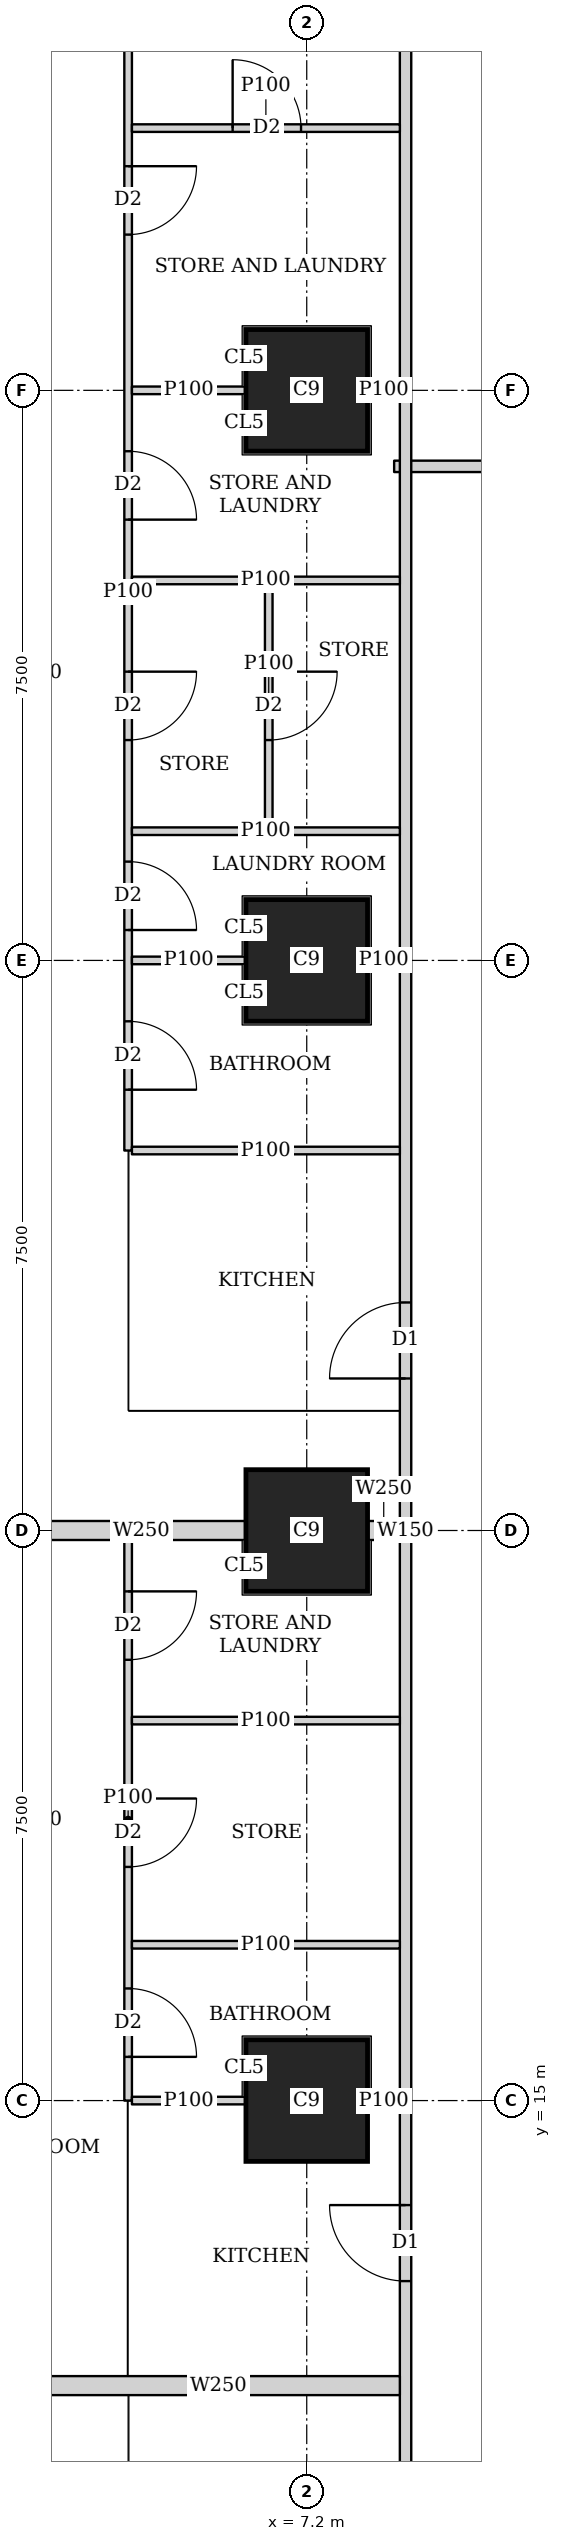
"""IFC4 building model, lengths in metres.
Left out: names, types, materials, properties, quantities, classifications, styles, units other than length and angle.
Written with IfcOpenShell. Run it as: python <this file> out.ifc"""

import sys

from ifc_helpers import new_model, si_unit, direction, frame, frame_2d, origin, origin_2d, place, context, subcontext, project, spatial, rectangle, extrude, element, fill, save


model = new_model("IFC4")
c1 = context("Model", 3, precision=1e-05, world=origin(), true_north=direction((0.0, 1.0)))
c2 = subcontext(c1, "Body", "Model", "MODEL_VIEW")
j1 = project(units=[si_unit("LENGTHUNIT", "METRE"), si_unit("PLANEANGLEUNIT", "RADIAN")], contexts=[c1])
p1 = place(None, origin())
s1 = spatial("IfcSite", under=j1, at=p1, CompositionType="ELEMENT")
p2 = place(p1, origin())
s2 = spatial("IfcBuilding", under=s1, at=p2, CompositionType="ELEMENT")
p3 = place(p2, frame((0.0, 0.0, 111.65)))
s3 = spatial("IfcBuildingStorey", under=s2, at=p3, CompositionType="ELEMENT", Elevation=111.65)
for number, where, z_axis, x_axis in (
    (1, (7.2, 15.0, 0.0), (0.0, 0.0, 1.0), (1.0, 0.0, 0.0)),
    (2, (7.2, 22.5, 0.0), (0.0, 0.0, 1.0), (1.0, 0.0, 0.0)),
    (3, (7.2, 30.0, 0.0), (0.0, 0.0, 1.0), (1.0, 0.0, 0.0)),
    (4, (7.2, 37.5, 0.0), (0.0, 0.0, 1.0), (1.0, 0.0, 0.0)),
):
    element("IfcColumn", number, at=place(p3, frame(where, z_axis=z_axis, x_axis=x_axis)), inside=s3, PredefinedType="COLUMN", context=c2, shape_type="SweptSolid", body=[
        extrude(rectangle(XDim=1.6, YDim=1.6, at=origin_2d()), origin(), (0.0, 0.0, 1.0), 3.75),
    ])
p4 = place(p3, frame((8.5, -0.65, 0.0), z_axis=(0.0, 0.0, 1.0), x_axis=(0.0, 1.0, 0.0)))
e5 = element("IfcWall", 5, at=p4, inside=s3, PredefinedType="SOLIDWALL", context=c2, shape_type="SweptSolid", body=[
    extrude(rectangle(XDim=46.3, YDim=0.15, at=frame_2d((23.15, 0.0))), origin(), (0.0, 0.0, 1.0), 2.2),
])
p5 = place(p4, frame((9.525, 0.0, 0.0)))
e6 = element("IfcOpeningElement", 6, at=p5, cuts=e5, PredefinedType="OPENING", context=c2, shape_type="SweptSolid", body=[
    extrude(rectangle(XDim=1.0, YDim=2.1, at=frame_2d((0.5, 1.05))), frame((0.0, 0.085, 0.0), z_axis=(0.0, -1.0, 0.0), x_axis=(1.0, 0.0, 0.0)), (0.0, 0.0, 1.0), 0.17),
])
p6 = place(p4, frame((13.275, 0.0, 0.0)))
e7 = element("IfcOpeningElement", 7, at=p6, cuts=e5, PredefinedType="OPENING", context=c2, shape_type="SweptSolid", body=[
    extrude(rectangle(XDim=1.0, YDim=2.1, at=frame_2d((0.5, 1.05))), frame((0.0, 0.085, 0.0), z_axis=(0.0, -1.0, 0.0), x_axis=(1.0, 0.0, 0.0)), (0.0, 0.0, 1.0), 0.17),
])
p7 = place(p4, frame((25.15, 0.0, 0.0)))
e8 = element("IfcOpeningElement", 8, at=p7, cuts=e5, PredefinedType="OPENING", context=c2, shape_type="SweptSolid", body=[
    extrude(rectangle(XDim=1.0, YDim=2.1, at=frame_2d((0.5, 1.05))), frame((0.0, 0.085, 0.0), z_axis=(0.0, -1.0, 0.0), x_axis=(1.0, 0.0, 0.0)), (0.0, 0.0, 1.0), 0.17),
])
p8 = place(p3, frame((8.35, 36.5, 0.0), z_axis=(0.0, 0.0, 1.0), x_axis=(1.0, 0.0, 0.0)))
e9 = element("IfcWall", 9, at=p8, inside=s3, PredefinedType="SOLIDWALL", context=c2, shape_type="SweptSolid", body=[
    extrude(rectangle(XDim=26.415, YDim=0.15, at=frame_2d((13.208, 0.0))), origin(), (0.0, 0.0, 1.0), 3.5),
])
p9 = place(p8, frame((2.6, 0.0, 0.0)))
e10 = element("IfcOpeningElement", 10, at=p9, cuts=e9, PredefinedType="OPENING", context=c2, shape_type="SweptSolid", body=[
    extrude(rectangle(XDim=1.0, YDim=2.1, at=frame_2d((0.5, 1.05))), frame((0.0, 0.085, 0.0), z_axis=(0.0, -1.0, 0.0), x_axis=(1.0, 0.0, 0.0)), (0.0, 0.0, 1.0), 0.17),
])
p10 = place(p8, frame((10.949, 0.0, 0.0)))
e11 = element("IfcOpeningElement", 11, at=p10, cuts=e9, PredefinedType="OPENING", context=c2, shape_type="SweptSolid", body=[
    extrude(rectangle(XDim=1.0, YDim=2.1, at=frame_2d((0.5, 1.05))), frame((0.0, 0.085, 0.0), z_axis=(0.0, -1.0, 0.0), x_axis=(1.0, 0.0, 0.0)), (0.0, 0.0, 1.0), 0.17),
])
p11 = place(p8, frame((23.923, 0.0, 0.0)))
e12 = element("IfcOpeningElement", 12, at=p11, cuts=e9, PredefinedType="OPENING", context=c2, shape_type="SweptSolid", body=[
    extrude(rectangle(XDim=1.0, YDim=2.1, at=frame_2d((0.5, 1.05))), frame((0.0, 0.085, 0.0), z_axis=(0.0, -1.0, 0.0), x_axis=(1.0, 0.0, 0.0)), (0.0, 0.0, 1.0), 0.17),
])
p12 = place(p3, frame((4.85, 15.0, 0.0), z_axis=(0.0, 0.0, 1.0), x_axis=(0.0, 1.0, 0.0)))
e13 = element("IfcWall", 13, at=p12, inside=s3, PredefinedType="PARTITIONING", context=c2, shape_type="SweptSolid", body=[
    extrude(rectangle(XDim=7.375, YDim=0.1, at=frame_2d((3.688, 0.0))), origin(), (0.0, 0.0, 1.0), 3.5),
])
p13 = place(p12, frame((0.575, 0.0, 0.0)))
e14 = element("IfcOpeningElement", 14, at=p13, cuts=e13, PredefinedType="OPENING", context=c2, shape_type="SweptSolid", body=[
    extrude(rectangle(XDim=0.9, YDim=2.1, at=frame_2d((0.45, 1.05))), frame((0.0, 0.06, 0.0), z_axis=(0.0, -1.0, 0.0), x_axis=(1.0, 0.0, 0.0)), (0.0, 0.0, 1.0), 0.12),
])
p14 = place(p12, frame((5.799, 0.0, 0.0)))
e15 = element("IfcOpeningElement", 15, at=p14, cuts=e13, PredefinedType="OPENING", context=c2, shape_type="SweptSolid", body=[
    extrude(rectangle(XDim=0.9, YDim=2.1, at=frame_2d((0.45, 1.05))), frame((0.0, 0.06, 0.0), z_axis=(0.0, -1.0, 0.0), x_axis=(1.0, 0.0, 0.0)), (0.0, 0.0, 1.0), 0.12),
])
p15 = place(p12, frame((3.074, 0.0, 0.0)))
e16 = element("IfcOpeningElement", 16, at=p15, cuts=e13, PredefinedType="OPENING", context=c2, shape_type="SweptSolid", body=[
    extrude(rectangle(XDim=0.9, YDim=2.1, at=frame_2d((0.45, 1.05))), frame((0.0, 0.06, 0.0), z_axis=(0.0, -1.0, 0.0), x_axis=(1.0, 0.0, 0.0)), (0.0, 0.0, 1.0), 0.12),
])
p16 = place(p3, frame((4.9, 15.0, 0.0), z_axis=(0.0, 0.0, 1.0), x_axis=(1.0, 0.0, 0.0)))
e17 = element("IfcWall", 17, at=p16, inside=s3, PredefinedType="PARTITIONING", context=c2, shape_type="SweptSolid", body=[
    extrude(rectangle(XDim=1.499, YDim=0.1, at=frame_2d((0.75, 0.0))), origin(), (0.0, 0.0, 1.0), 3.5),
])
p17 = place(p3, frame((8.001, 15.0, 0.0), z_axis=(0.0, 0.0, 1.0), x_axis=(1.0, 0.0, 0.0)))
e18 = element("IfcWall", 18, at=p17, inside=s3, PredefinedType="PARTITIONING", context=c2, shape_type="SweptSolid", body=[
    extrude(rectangle(XDim=0.424, YDim=0.1, at=frame_2d((0.212, 0.0))), origin(), (0.0, 0.0, 1.0), 3.5),
])
for number, where, z_axis, x_axis in (
    (19, (4.9, 19.999, 0.0), (0.0, 0.0, 1.0), (1.0, 0.0, 0.0)),
    (20, (4.9, 17.05, 0.0), (0.0, 0.0, 1.0), (1.0, 0.0, 0.0)),
):
    element("IfcWall", number, at=place(p3, frame(where, z_axis=z_axis, x_axis=x_axis)), inside=s3, PredefinedType="PARTITIONING", context=c2, shape_type="SweptSolid", body=[
        extrude(rectangle(XDim=3.525, YDim=0.1, at=frame_2d((1.763, 0.0))), origin(), (0.0, 0.0, 1.0), 3.5),
    ])
p18 = place(p3, frame((3.65, 11.25, 0.0), z_axis=(0.0, 0.0, 1.0), x_axis=(1.0, 0.0, 0.0)))
e21 = element("IfcWall", 21, at=p18, inside=s3, PredefinedType="SOLIDWALL", context=c2, shape_type="SweptSolid", body=[
    extrude(rectangle(XDim=4.775, YDim=0.25, at=frame_2d((2.388, 0.0))), origin(), (0.0, 0.0, 1.0), 3.5),
])
p19 = place(p3, frame((4.85, 27.499, 0.0), z_axis=(0.0, 0.0, 1.0), x_axis=(0.0, 1.0, 0.0)))
e22 = element("IfcWall", 22, at=p19, inside=s3, PredefinedType="PARTITIONING", context=c2, shape_type="SweptSolid", body=[
    extrude(rectangle(XDim=14.7, YDim=0.1, at=frame_2d((7.35, 0.0))), origin(), (0.0, 0.0, 1.0), 3.5),
])
p20 = place(p19, frame((0.8, 0.0, 0.0)))
e23 = element("IfcOpeningElement", 23, at=p20, cuts=e22, PredefinedType="OPENING", context=c2, shape_type="SweptSolid", body=[
    extrude(rectangle(XDim=0.9, YDim=2.1, at=frame_2d((0.45, 1.05))), frame((0.0, 0.06, 0.0), z_axis=(0.0, -1.0, 0.0), x_axis=(1.0, 0.0, 0.0)), (0.0, 0.0, 1.0), 0.12),
])
p21 = place(p19, frame((2.901, 0.0, 0.0)))
e24 = element("IfcOpeningElement", 24, at=p21, cuts=e22, PredefinedType="OPENING", context=c2, shape_type="SweptSolid", body=[
    extrude(rectangle(XDim=0.9, YDim=2.1, at=frame_2d((0.45, 1.05))), frame((0.0, 0.06, 0.0), z_axis=(0.0, -1.0, 0.0), x_axis=(1.0, 0.0, 0.0)), (0.0, 0.0, 1.0), 0.12),
])
p22 = place(p19, frame((8.3, 0.0, 0.0)))
e25 = element("IfcOpeningElement", 25, at=p22, cuts=e22, PredefinedType="OPENING", context=c2, shape_type="SweptSolid", body=[
    extrude(rectangle(XDim=0.9, YDim=2.1, at=frame_2d((0.45, 1.05))), frame((0.0, 0.06, 0.0), z_axis=(0.0, -1.0, 0.0), x_axis=(1.0, 0.0, 0.0)), (0.0, 0.0, 1.0), 0.12),
])
p23 = place(p19, frame((12.05, 0.0, 0.0)))
e26 = element("IfcOpeningElement", 26, at=p23, cuts=e22, PredefinedType="OPENING", context=c2, shape_type="SweptSolid", body=[
    extrude(rectangle(XDim=0.9, YDim=2.1, at=frame_2d((0.45, 1.05))), frame((0.0, 0.06, 0.0), z_axis=(0.0, -1.0, 0.0), x_axis=(1.0, 0.0, 0.0)), (0.0, 0.0, 1.0), 0.12),
])
p24 = place(p19, frame((5.4, 0.0, 0.0)))
e27 = element("IfcOpeningElement", 27, at=p24, cuts=e22, PredefinedType="OPENING", context=c2, shape_type="SweptSolid", body=[
    extrude(rectangle(XDim=0.9, YDim=2.1, at=frame_2d((0.45, 1.05))), frame((0.0, 0.06, 0.0), z_axis=(0.0, -1.0, 0.0), x_axis=(1.0, 0.0, 0.0)), (0.0, 0.0, 1.0), 0.12),
])
p25 = place(p3, frame((4.9, 27.499, 0.0), z_axis=(0.0, 0.0, 1.0), x_axis=(1.0, 0.0, 0.0)))
e28 = element("IfcWall", 28, at=p25, inside=s3, PredefinedType="PARTITIONING", context=c2, shape_type="SweptSolid", body=[
    extrude(rectangle(XDim=3.525, YDim=0.1, at=frame_2d((1.763, 0.0))), origin(), (0.0, 0.0, 1.0), 3.5),
])
p26 = place(p3, frame((4.9, 30.0, 0.0), z_axis=(0.0, 0.0, 1.0), x_axis=(1.0, 0.0, 0.0)))
e29 = element("IfcWall", 29, at=p26, inside=s3, PredefinedType="PARTITIONING", context=c2, shape_type="SweptSolid", body=[
    extrude(rectangle(XDim=1.499, YDim=0.1, at=frame_2d((0.75, 0.0))), origin(), (0.0, 0.0, 1.0), 3.5),
])
p27 = place(p3, frame((8.001, 30.0, 0.0), z_axis=(0.0, 0.0, 1.0), x_axis=(1.0, 0.0, 0.0)))
e30 = element("IfcWall", 30, at=p27, inside=s3, PredefinedType="PARTITIONING", context=c2, shape_type="SweptSolid", body=[
    extrude(rectangle(XDim=0.424, YDim=0.1, at=frame_2d((0.212, 0.0))), origin(), (0.0, 0.0, 1.0), 3.5),
])
p28 = place(p3, frame((4.9, 34.999, 0.0), z_axis=(0.0, 0.0, 1.0), x_axis=(1.0, 0.0, 0.0)))
e31 = element("IfcWall", 31, at=p28, inside=s3, PredefinedType="PARTITIONING", context=c2, shape_type="SweptSolid", body=[
    extrude(rectangle(XDim=3.525, YDim=0.1, at=frame_2d((1.763, 0.0))), origin(), (0.0, 0.0, 1.0), 3.5),
])
p29 = place(p3, frame((4.9, 37.5, 0.0), z_axis=(0.0, 0.0, 1.0), x_axis=(1.0, 0.0, 0.0)))
e32 = element("IfcWall", 32, at=p29, inside=s3, PredefinedType="PARTITIONING", context=c2, shape_type="SweptSolid", body=[
    extrude(rectangle(XDim=1.499, YDim=0.1, at=frame_2d((0.75, 0.0))), origin(), (0.0, 0.0, 1.0), 3.5),
])
p30 = place(p3, frame((8.001, 37.5, 0.0), z_axis=(0.0, 0.0, 1.0), x_axis=(1.0, 0.0, 0.0)))
e33 = element("IfcWall", 33, at=p30, inside=s3, PredefinedType="PARTITIONING", context=c2, shape_type="SweptSolid", body=[
    extrude(rectangle(XDim=0.424, YDim=0.1, at=frame_2d((0.212, 0.0))), origin(), (0.0, 0.0, 1.0), 3.5),
])
p31 = place(p3, frame((4.9, 31.7, 0.0), z_axis=(0.0, 0.0, 1.0), x_axis=(1.0, 0.0, 0.0)))
e34 = element("IfcWall", 34, at=p31, inside=s3, PredefinedType="PARTITIONING", context=c2, shape_type="SweptSolid", body=[
    extrude(rectangle(XDim=3.525, YDim=0.1, at=frame_2d((1.763, 0.0))), origin(), (0.0, 0.0, 1.0), 3.5),
])
p32 = place(p3, frame((3.65, 22.5, 0.0), z_axis=(0.0, 0.0, 1.0), x_axis=(1.0, 0.0, 0.0)))
e35 = element("IfcWall", 35, at=p32, inside=s3, PredefinedType="SOLIDWALL", context=c2, shape_type="SweptSolid", body=[
    extrude(rectangle(XDim=2.749, YDim=0.25, at=frame_2d((1.375, 0.0))), origin(), (0.0, 0.0, 1.0), 3.5),
])
p33 = place(p3, frame((8.001, 22.5, 0.0), z_axis=(0.0, 0.0, 1.0), x_axis=(1.0, 0.0, 0.0)))
e36 = element("IfcWall", 36, at=p33, inside=s3, PredefinedType="SOLIDWALL", context=c2, shape_type="SweptSolid", body=[
    extrude(rectangle(XDim=0.424, YDim=0.25, at=frame_2d((0.212, 0.0))), origin(), (0.0, 0.0, 1.0), 3.5),
])
p34 = place(p3, frame((6.7, 31.75, 0.0), z_axis=(0.0, 0.0, 1.0), x_axis=(0.0, 1.0, 0.0)))
e37 = element("IfcWall", 37, at=p34, inside=s3, PredefinedType="PARTITIONING", context=c2, shape_type="SweptSolid", body=[
    extrude(rectangle(XDim=3.199, YDim=0.1, at=frame_2d((1.6, 0.0))), origin(), (0.0, 0.0, 1.0), 3.5),
])
p35 = place(p34, frame((1.149, 0.0, 0.0)))
e38 = element("IfcOpeningElement", 38, at=p35, cuts=e37, PredefinedType="OPENING", context=c2, shape_type="SweptSolid", body=[
    extrude(rectangle(XDim=0.9, YDim=2.1, at=frame_2d((0.45, 1.05))), frame((0.0, 0.06, 0.0), z_axis=(0.0, -1.0, 0.0), x_axis=(1.0, 0.0, 0.0)), (0.0, 0.0, 1.0), 0.12),
])
p36 = place(p3, frame((8.425, 40.95, 0.0), z_axis=(0.0, 0.0, 1.0), x_axis=(-1.0, 0.0, 0.0)))
e39 = element("IfcWall", 39, at=p36, inside=s3, PredefinedType="PARTITIONING", context=c2, shape_type="SweptSolid", body=[
    extrude(rectangle(XDim=3.525, YDim=0.1, at=frame_2d((1.763, 0.0))), origin(), (0.0, 0.0, 1.0), 3.5),
])
p37 = place(p36, frame((1.3, 0.0, 0.0)))
e40 = element("IfcOpeningElement", 40, at=p37, cuts=e39, PredefinedType="OPENING", context=c2, shape_type="SweptSolid", body=[
    extrude(rectangle(XDim=0.9, YDim=2.1, at=frame_2d((0.45, 1.05))), frame((0.0, 0.06, 0.0), z_axis=(0.0, -1.0, 0.0), x_axis=(1.0, 0.0, 0.0)), (0.0, 0.0, 1.0), 0.12),
])
p38 = place(p13, origin())
e41 = element("IfcDoor", 41, at=p38, inside=s3, OperationType="SINGLE_SWING_RIGHT", PredefinedType="DOOR", context=c2, shape_type="SweptSolid", body=[
    extrude(rectangle(XDim=0.9, YDim=2.1, at=frame_2d((0.45, 1.05))), frame((0.0, 0.025, 0.0), z_axis=(0.0, -1.0, 0.0), x_axis=(1.0, 0.0, 0.0)), (0.0, 0.0, 1.0), 0.05),
])
fill(e14, e41)
p39 = place(p14, origin())
e42 = element("IfcDoor", 42, at=p39, inside=s3, OperationType="SINGLE_SWING_LEFT", PredefinedType="DOOR", context=c2, shape_type="SweptSolid", body=[
    extrude(rectangle(XDim=0.9, YDim=2.1, at=frame_2d((0.45, 1.05))), frame((0.0, 0.025, 0.0), z_axis=(0.0, -1.0, 0.0), x_axis=(1.0, 0.0, 0.0)), (0.0, 0.0, 1.0), 0.05),
])
fill(e15, e42)
p40 = place(p15, origin())
e43 = element("IfcDoor", 43, at=p40, inside=s3, OperationType="SINGLE_SWING_LEFT", PredefinedType="DOOR", context=c2, shape_type="SweptSolid", body=[
    extrude(rectangle(XDim=0.9, YDim=2.1, at=frame_2d((0.45, 1.05))), frame((0.0, 0.025, 0.0), z_axis=(0.0, -1.0, 0.0), x_axis=(1.0, 0.0, 0.0)), (0.0, 0.0, 1.0), 0.05),
])
fill(e16, e43)
p41 = place(p6, origin())
e44 = element("IfcDoor", 44, at=p41, inside=s3, OperationType="SINGLE_SWING_RIGHT", PredefinedType="DOOR", context=c2, shape_type="SweptSolid", body=[
    extrude(rectangle(XDim=1.0, YDim=2.1, at=frame_2d((0.5, 1.05))), frame((0.0, 0.025, 0.0), z_axis=(0.0, -1.0, 0.0), x_axis=(1.0, 0.0, 0.0)), (0.0, 0.0, 1.0), 0.05),
])
fill(e7, e44)
p42 = place(p20, origin())
e45 = element("IfcDoor", 45, at=p42, inside=s3, OperationType="SINGLE_SWING_RIGHT", PredefinedType="DOOR", context=c2, shape_type="SweptSolid", body=[
    extrude(rectangle(XDim=0.9, YDim=2.1, at=frame_2d((0.45, 1.05))), frame((0.0, 0.025, 0.0), z_axis=(0.0, -1.0, 0.0), x_axis=(1.0, 0.0, 0.0)), (0.0, 0.0, 1.0), 0.05),
])
fill(e23, e45)
p43 = place(p21, origin())
e46 = element("IfcDoor", 46, at=p43, inside=s3, OperationType="SINGLE_SWING_RIGHT", PredefinedType="DOOR", context=c2, shape_type="SweptSolid", body=[
    extrude(rectangle(XDim=0.9, YDim=2.1, at=frame_2d((0.45, 1.05))), frame((0.0, 0.025, 0.0), z_axis=(0.0, -1.0, 0.0), x_axis=(1.0, 0.0, 0.0)), (0.0, 0.0, 1.0), 0.05),
])
fill(e24, e46)
p44 = place(p22, origin())
e47 = element("IfcDoor", 47, at=p44, inside=s3, OperationType="SINGLE_SWING_RIGHT", PredefinedType="DOOR", context=c2, shape_type="SweptSolid", body=[
    extrude(rectangle(XDim=0.9, YDim=2.1, at=frame_2d((0.45, 1.05))), frame((0.0, 0.025, 0.0), z_axis=(0.0, -1.0, 0.0), x_axis=(1.0, 0.0, 0.0)), (0.0, 0.0, 1.0), 0.05),
])
fill(e25, e47)
p45 = place(p23, origin())
e48 = element("IfcDoor", 48, at=p45, inside=s3, OperationType="SINGLE_SWING_LEFT", PredefinedType="DOOR", context=c2, shape_type="SweptSolid", body=[
    extrude(rectangle(XDim=0.9, YDim=2.1, at=frame_2d((0.45, 1.05))), frame((0.0, 0.025, 0.0), z_axis=(0.0, -1.0, 0.0), x_axis=(1.0, 0.0, 0.0)), (0.0, 0.0, 1.0), 0.05),
])
fill(e26, e48)
p46 = place(p24, origin())
e49 = element("IfcDoor", 49, at=p46, inside=s3, OperationType="SINGLE_SWING_LEFT", PredefinedType="DOOR", context=c2, shape_type="SweptSolid", body=[
    extrude(rectangle(XDim=0.9, YDim=2.1, at=frame_2d((0.45, 1.05))), frame((0.0, 0.025, 0.0), z_axis=(0.0, -1.0, 0.0), x_axis=(1.0, 0.0, 0.0)), (0.0, 0.0, 1.0), 0.05),
])
fill(e27, e49)
p47 = place(p7, origin())
e50 = element("IfcDoor", 50, at=p47, inside=s3, OperationType="SINGLE_SWING_LEFT", PredefinedType="DOOR", context=c2, shape_type="SweptSolid", body=[
    extrude(rectangle(XDim=1.0, YDim=2.1, at=frame_2d((0.5, 1.05))), frame((0.0, 0.025, 0.0), z_axis=(0.0, -1.0, 0.0), x_axis=(1.0, 0.0, 0.0)), (0.0, 0.0, 1.0), 0.05),
])
fill(e8, e50)
p48 = place(p35, origin())
e51 = element("IfcDoor", 51, at=p48, inside=s3, OperationType="SINGLE_SWING_LEFT", PredefinedType="DOOR", context=c2, shape_type="SweptSolid", body=[
    extrude(rectangle(XDim=0.9, YDim=2.1, at=frame_2d((0.45, 1.05))), frame((0.0, 0.025, 0.0), z_axis=(0.0, -1.0, 0.0), x_axis=(1.0, 0.0, 0.0)), (0.0, 0.0, 1.0), 0.05),
])
fill(e38, e51)
p49 = place(p37, origin())
e52 = element("IfcDoor", 52, at=p49, inside=s3, OperationType="SINGLE_SWING_LEFT", PredefinedType="DOOR", context=c2, shape_type="SweptSolid", body=[
    extrude(rectangle(XDim=0.9, YDim=2.1, at=frame_2d((0.45, 1.05))), frame((0.0, 0.025, 0.0), z_axis=(0.0, -1.0, 0.0), x_axis=(1.0, 0.0, 0.0)), (0.0, 0.0, 1.0), 0.05),
])
fill(e40, e52)
save(model, sys.argv[1])
